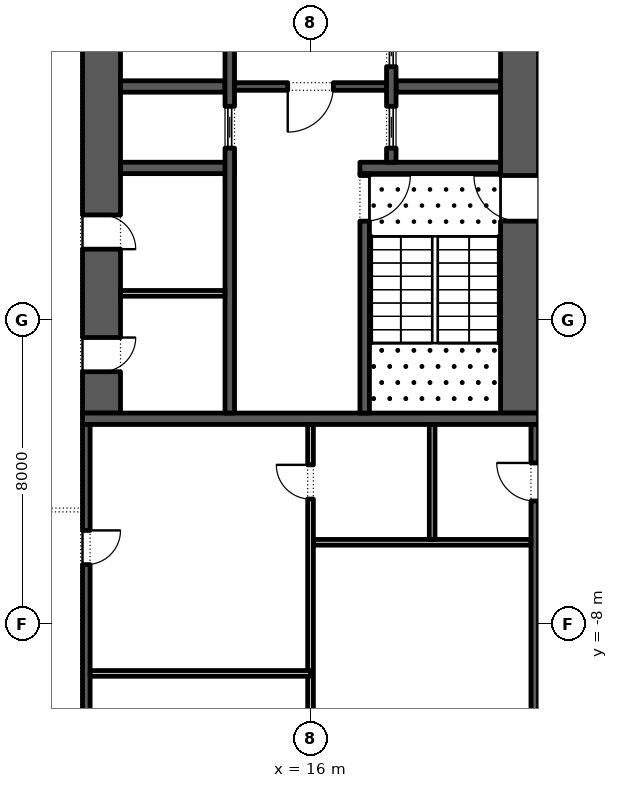
"""IFC4 building model, lengths in metres.
Left out: names, types, materials, properties, quantities, classifications, styles, units other than length and angle.
Written with IfcOpenShell. Run it as: python <this file> out.ifc"""

import sys

from ifc_helpers import new_model, si_unit, direction, frame, frame_2d, origin, place, context, subcontext, project, spatial, rectangle, extrude, element, fill, save


model = new_model("IFC4")
c1 = context("Model", 3, precision=1e-05, world=origin(), true_north=direction((0.0, 1.0)))
c2 = subcontext(c1, "Body", "Model", "MODEL_VIEW")
j1 = project(units=[si_unit("LENGTHUNIT", "METRE"), si_unit("PLANEANGLEUNIT", "RADIAN")], contexts=[c1])
p1 = place(None, origin())
s1 = spatial("IfcSite", under=j1, at=p1, CompositionType="ELEMENT")
p2 = place(p1, origin())
s2 = spatial("IfcBuilding", under=s1, at=p2, CompositionType="ELEMENT")
p3 = place(p2, frame((0.0, 0.0, 33.6)))
s3 = spatial("IfcBuildingStorey", under=s2, at=p3, CompositionType="ELEMENT", Elevation=33.6)
p4 = place(p3, frame((21.5, -2.45, 0.0), z_axis=(0.0, 0.0, 1.0), x_axis=(0.0, 1.0, 0.0)))
e1 = element("IfcWall", 1, at=p4, inside=s3, PredefinedType="SHEAR", context=c2, shape_type="SweptSolid", body=[
    extrude(rectangle(XDim=27.9, YDim=1.0, at=frame_2d((13.95, 0.0))), origin(), (0.0, 0.0, 1.0), 5.8),
])
p5 = place(p4, frame((5.05, 0.0, 0.0)))
e2 = element("IfcOpeningElement", 2, at=p5, cuts=e1, PredefinedType="OPENING", context=c2, shape_type="SweptSolid", body=[
    extrude(rectangle(XDim=1.2, YDim=2.1, at=frame_2d((0.6, 1.05))), frame((0.0, 0.51, 0.0), z_axis=(0.0, -1.0, 0.0), x_axis=(1.0, 0.0, 0.0)), (0.0, 0.0, 1.0), 1.02),
])
p6 = place(p4, frame((21.65, 0.0, 0.0)))
e3 = element("IfcOpeningElement", 3, at=p6, cuts=e1, PredefinedType="OPENING", context=c2, shape_type="SweptSolid", body=[
    extrude(rectangle(XDim=1.2, YDim=2.1, at=frame_2d((0.6, 1.05))), frame((0.0, 0.51, 0.0), z_axis=(0.0, -1.0, 0.0), x_axis=(1.0, 0.0, 0.0)), (0.0, 0.0, 1.0), 1.02),
])
p7 = place(p3, frame((10.5, -2.45, 0.0), z_axis=(0.0, 0.0, 1.0), x_axis=(0.0, 1.0, 0.0)))
e4 = element("IfcWall", 4, at=p7, inside=s3, PredefinedType="SHEAR", context=c2, shape_type="SweptSolid", body=[
    extrude(rectangle(XDim=27.9, YDim=1.0, at=frame_2d((13.95, 0.0))), origin(), (0.0, 0.0, 1.0), 5.8),
])
p8 = place(p7, frame((23.65, 0.0, 0.0)))
e5 = element("IfcOpeningElement", 5, at=p8, cuts=e4, PredefinedType="OPENING", context=c2, shape_type="SweptSolid", body=[
    extrude(rectangle(XDim=2.4, YDim=2.1, at=frame_2d((1.2, 1.05))), frame((0.0, 0.51, 0.0), z_axis=(0.0, -1.0, 0.0), x_axis=(1.0, 0.0, 0.0)), (0.0, 0.0, 1.0), 1.02),
])
p9 = place(p7, frame((1.087, 0.0, 0.0)))
e6 = element("IfcOpeningElement", 6, at=p9, cuts=e4, PredefinedType="OPENING", context=c2, shape_type="SweptSolid", body=[
    extrude(rectangle(XDim=0.9, YDim=2.1, at=frame_2d((0.45, 1.05))), frame((0.0, 0.51, 0.0), z_axis=(0.0, -1.0, 0.0), x_axis=(1.0, 0.0, 0.0)), (0.0, 0.0, 1.0), 1.02),
])
p10 = place(p7, frame((4.312, 0.0, 0.0)))
e7 = element("IfcOpeningElement", 7, at=p10, cuts=e4, PredefinedType="OPENING", context=c2, shape_type="SweptSolid", body=[
    extrude(rectangle(XDim=0.9, YDim=2.1, at=frame_2d((0.45, 1.05))), frame((0.0, 0.51, 0.0), z_axis=(0.0, -1.0, 0.0), x_axis=(1.0, 0.0, 0.0)), (0.0, 0.0, 1.0), 1.02),
])
p11 = place(p3, frame((10.0, -2.6, 0.0), z_axis=(0.0, 0.0, 1.0), x_axis=(1.0, 0.0, 0.0)))
e8 = element("IfcWall", 8, at=p11, inside=s3, PredefinedType="SHEAR", context=c2, shape_type="SweptSolid", body=[
    extrude(rectangle(XDim=12.0, YDim=0.3, at=frame_2d((6.0, 0.0))), origin(), (0.0, 0.0, 1.0), 5.8),
])
p12 = place(p3, frame((17.3, 4.0, 0.0), z_axis=(0.0, 0.0, 1.0), x_axis=(1.0, 0.0, 0.0)))
e9 = element("IfcWall", 9, at=p12, inside=s3, PredefinedType="SHEAR", context=c2, shape_type="SweptSolid", body=[
    extrude(rectangle(XDim=3.7, YDim=0.3, at=frame_2d((1.85, 0.0))), origin(), (0.0, 0.0, 1.0), 5.8),
])
p13 = place(p3, frame((17.425, -2.45, 0.0), z_axis=(0.0, 0.0, 1.0), x_axis=(0.0, 1.0, 0.0)))
e10 = element("IfcWall", 10, at=p13, inside=s3, PredefinedType="SHEAR", context=c2, shape_type="SweptSolid", body=[
    extrude(rectangle(XDim=6.3, YDim=0.25, at=frame_2d((3.15, 0.0))), origin(), (0.0, 0.0, 1.0), 5.8),
])
p14 = place(p13, frame((5.05, 0.0, 0.0)))
e11 = element("IfcOpeningElement", 11, at=p14, cuts=e10, PredefinedType="OPENING", context=c2, shape_type="SweptSolid", body=[
    extrude(rectangle(XDim=1.2, YDim=2.1, at=frame_2d((0.6, 1.05))), frame((0.0, 0.135, 0.0), z_axis=(0.0, -1.0, 0.0), x_axis=(1.0, 0.0, 0.0)), (0.0, 0.0, 1.0), 0.27),
])
p15 = place(p3, frame((18.25, 6.143, 0.0), z_axis=(0.0, 0.0, 1.0), x_axis=(1.0, 0.0, 0.0)))
e12 = element("IfcWall", 12, at=p15, inside=s3, PredefinedType="SHEAR", context=c2, shape_type="SweptSolid", body=[
    extrude(rectangle(XDim=2.75, YDim=0.3, at=frame_2d((1.375, 0.0))), origin(), (0.0, 0.0, 1.0), 5.8),
])
p16 = place(p3, frame((18.125, 4.15, 0.0), z_axis=(0.0, 0.0, 1.0), x_axis=(0.0, 1.0, 0.0)))
e13 = element("IfcWall", 13, at=p16, inside=s3, PredefinedType="SHEAR", context=c2, shape_type="SweptSolid", body=[
    extrude(rectangle(XDim=14.7, YDim=0.25, at=frame_2d((7.35, 0.0))), origin(), (0.0, 0.0, 1.0), 5.8),
])
p17 = place(p16, frame((0.371, 0.0, 0.0)))
e14 = element("IfcOpeningElement", 14, at=p17, cuts=e13, PredefinedType="OPENING", context=c2, shape_type="SweptSolid", body=[
    extrude(rectangle(XDim=1.1, YDim=2.1, at=frame_2d((0.55, 1.05))), frame((0.0, 0.135, 0.0), z_axis=(0.0, -1.0, 0.0), x_axis=(1.0, 0.0, 0.0)), (0.0, 0.0, 1.0), 0.27),
])
p18 = place(p16, frame((2.514, 0.0, 0.0)))
e15 = element("IfcOpeningElement", 15, at=p18, cuts=e13, PredefinedType="OPENING", context=c2, shape_type="SweptSolid", body=[
    extrude(rectangle(XDim=1.1, YDim=2.1, at=frame_2d((0.55, 1.05))), frame((0.0, 0.135, 0.0), z_axis=(0.0, -1.0, 0.0), x_axis=(1.0, 0.0, 0.0)), (0.0, 0.0, 1.0), 0.27),
])
p19 = place(p16, frame((4.657, 0.0, 0.0)))
e16 = element("IfcOpeningElement", 16, at=p19, cuts=e13, PredefinedType="OPENING", context=c2, shape_type="SweptSolid", body=[
    extrude(rectangle(XDim=1.1, YDim=2.1, at=frame_2d((0.55, 1.05))), frame((0.0, 0.135, 0.0), z_axis=(0.0, -1.0, 0.0), x_axis=(1.0, 0.0, 0.0)), (0.0, 0.0, 1.0), 0.27),
])
p20 = place(p16, frame((6.8, 0.0, 0.0)))
e17 = element("IfcOpeningElement", 17, at=p20, cuts=e13, PredefinedType="OPENING", context=c2, shape_type="SweptSolid", body=[
    extrude(rectangle(XDim=1.1, YDim=2.1, at=frame_2d((0.55, 1.05))), frame((0.0, 0.135, 0.0), z_axis=(0.0, -1.0, 0.0), x_axis=(1.0, 0.0, 0.0)), (0.0, 0.0, 1.0), 0.27),
])
p21 = place(p16, frame((8.943, 0.0, 0.0)))
e18 = element("IfcOpeningElement", 18, at=p21, cuts=e13, PredefinedType="OPENING", context=c2, shape_type="SweptSolid", body=[
    extrude(rectangle(XDim=1.1, YDim=2.1, at=frame_2d((0.55, 1.05))), frame((0.0, 0.135, 0.0), z_axis=(0.0, -1.0, 0.0), x_axis=(1.0, 0.0, 0.0)), (0.0, 0.0, 1.0), 0.27),
])
p22 = place(p16, frame((11.086, 0.0, 0.0)))
e19 = element("IfcOpeningElement", 19, at=p22, cuts=e13, PredefinedType="OPENING", context=c2, shape_type="SweptSolid", body=[
    extrude(rectangle(XDim=1.1, YDim=2.1, at=frame_2d((0.55, 1.05))), frame((0.0, 0.135, 0.0), z_axis=(0.0, -1.0, 0.0), x_axis=(1.0, 0.0, 0.0)), (0.0, 0.0, 1.0), 0.27),
])
p23 = place(p16, frame((13.229, 0.0, 0.0)))
e20 = element("IfcOpeningElement", 20, at=p23, cuts=e13, PredefinedType="OPENING", context=c2, shape_type="SweptSolid", body=[
    extrude(rectangle(XDim=1.1, YDim=2.1, at=frame_2d((0.55, 1.05))), frame((0.0, 0.135, 0.0), z_axis=(0.0, -1.0, 0.0), x_axis=(1.0, 0.0, 0.0)), (0.0, 0.0, 1.0), 0.27),
])
p24 = place(p3, frame((11.0, 4.0, 0.0), z_axis=(0.0, 0.0, 1.0), x_axis=(1.0, 0.0, 0.0)))
e21 = element("IfcWall", 21, at=p24, inside=s3, PredefinedType="SHEAR", context=c2, shape_type="SweptSolid", body=[
    extrude(rectangle(XDim=3.0, YDim=0.3, at=frame_2d((1.5, 0.0))), origin(), (0.0, 0.0, 1.0), 5.8),
])
p25 = place(p3, frame((11.0, 6.143, 0.0), z_axis=(0.0, 0.0, 1.0), x_axis=(1.0, 0.0, 0.0)))
e22 = element("IfcWall", 22, at=p25, inside=s3, PredefinedType="SHEAR", context=c2, shape_type="SweptSolid", body=[
    extrude(rectangle(XDim=2.75, YDim=0.3, at=frame_2d((1.375, 0.0))), origin(), (0.0, 0.0, 1.0), 5.8),
])
p26 = place(p3, frame((13.875, -2.45, 0.0), z_axis=(0.0, 0.0, 1.0), x_axis=(0.0, 1.0, 0.0)))
e23 = element("IfcWall", 23, at=p26, inside=s3, PredefinedType="SHEAR", context=c2, shape_type="SweptSolid", body=[
    extrude(rectangle(XDim=21.3, YDim=0.25, at=frame_2d((10.65, 0.0))), origin(), (0.0, 0.0, 1.0), 5.8),
])
p27 = place(p26, frame((14.571, 0.0, 0.0)))
e24 = element("IfcOpeningElement", 24, at=p27, cuts=e23, PredefinedType="OPENING", context=c2, shape_type="SweptSolid", body=[
    extrude(rectangle(XDim=0.9, YDim=2.1, at=frame_2d((0.45, 1.05))), frame((0.0, 0.135, 0.0), z_axis=(0.0, -1.0, 0.0), x_axis=(1.0, 0.0, 0.0)), (0.0, 0.0, 1.0), 0.27),
])
p28 = place(p26, frame((6.971, 0.0, 0.0)))
e25 = element("IfcOpeningElement", 25, at=p28, cuts=e23, PredefinedType="OPENING", context=c2, shape_type="SweptSolid", body=[
    extrude(rectangle(XDim=1.1, YDim=2.1, at=frame_2d((0.55, 1.05))), frame((0.0, 0.135, 0.0), z_axis=(0.0, -1.0, 0.0), x_axis=(1.0, 0.0, 0.0)), (0.0, 0.0, 1.0), 0.27),
])
p29 = place(p3, frame((14.0, 6.143, 0.0), z_axis=(0.0, 0.0, 1.0), x_axis=(1.0, 0.0, 0.0)))
e26 = element("IfcWall", 26, at=p29, inside=s3, PredefinedType="SHEAR", context=c2, shape_type="SweptSolid", body=[
    extrude(rectangle(XDim=4.0, YDim=0.2, at=frame_2d((2.0, 0.0))), origin(), (0.0, 0.0, 1.0), 5.8),
])
p30 = place(p29, frame((1.4, 0.0, 0.0)))
e27 = element("IfcOpeningElement", 27, at=p30, cuts=e26, PredefinedType="OPENING", context=c2, shape_type="SweptSolid", body=[
    extrude(rectangle(XDim=1.2, YDim=2.1, at=frame_2d((0.6, 1.05))), frame((0.0, 0.11, 0.0), z_axis=(0.0, -1.0, 0.0), x_axis=(1.0, 0.0, 0.0)), (0.0, 0.0, 1.0), 0.22),
])
p31 = place(p3, frame((11.0, 0.7, 0.0), z_axis=(0.0, 0.0, 1.0), x_axis=(1.0, 0.0, 0.0)))
e28 = element("IfcWall", 28, at=p31, inside=s3, PredefinedType="PARTITIONING", context=c2, shape_type="SweptSolid", body=[
    extrude(rectangle(XDim=2.75, YDim=0.15, at=frame_2d((1.375, 0.0))), origin(), (0.0, 0.0, 1.0), 5.8),
])
p32 = place(p3, frame((21.9, -15.8, 0.0), z_axis=(0.0, 0.0, 1.0), x_axis=(0.0, 1.0, 0.0)))
e29 = element("IfcWall", 29, at=p32, inside=s3, PredefinedType="SHEAR", context=c2, shape_type="SweptSolid", body=[
    extrude(rectangle(XDim=13.05, YDim=0.2, at=frame_2d((6.525, 0.0))), origin(), (0.0, 0.0, 1.0), 5.8),
])
p33 = place(p32, frame((4.488, 0.0, 0.0)))
e30 = element("IfcOpeningElement", 30, at=p33, cuts=e29, PredefinedType="OPENING", context=c2, shape_type="SweptSolid", body=[
    extrude(rectangle(XDim=0.9, YDim=2.1, at=frame_2d((0.45, 1.05))), frame((0.0, 0.11, 0.0), z_axis=(0.0, -1.0, 0.0), x_axis=(1.0, 0.0, 0.0)), (0.0, 0.0, 1.0), 0.22),
])
p34 = place(p32, frame((11.038, 0.0, 0.0)))
e31 = element("IfcOpeningElement", 31, at=p34, cuts=e29, PredefinedType="OPENING", context=c2, shape_type="SweptSolid", body=[
    extrude(rectangle(XDim=1.0, YDim=2.1, at=frame_2d((0.5, 1.05))), frame((0.0, 0.11, 0.0), z_axis=(0.0, -1.0, 0.0), x_axis=(1.0, 0.0, 0.0)), (0.0, 0.0, 1.0), 0.22),
])
p35 = place(p3, frame((10.1, -15.8, 0.0), z_axis=(0.0, 0.0, 1.0), x_axis=(0.0, 1.0, 0.0)))
e32 = element("IfcWall", 32, at=p35, inside=s3, PredefinedType="SHEAR", context=c2, shape_type="SweptSolid", body=[
    extrude(rectangle(XDim=13.05, YDim=0.2, at=frame_2d((6.525, 0.0))), origin(), (0.0, 0.0, 1.0), 5.8),
])
p36 = place(p35, frame((2.762, 0.0, 0.0)))
e33 = element("IfcOpeningElement", 33, at=p36, cuts=e32, PredefinedType="OPENING", context=c2, shape_type="SweptSolid", body=[
    extrude(rectangle(XDim=0.9, YDim=2.1, at=frame_2d((0.45, 1.05))), frame((0.0, 0.11, 0.0), z_axis=(0.0, -1.0, 0.0), x_axis=(1.0, 0.0, 0.0)), (0.0, 0.0, 1.0), 0.22),
])
p37 = place(p35, frame((9.363, 0.0, 0.0)))
e34 = element("IfcOpeningElement", 34, at=p37, cuts=e32, PredefinedType="OPENING", context=c2, shape_type="SweptSolid", body=[
    extrude(rectangle(XDim=0.9, YDim=2.1, at=frame_2d((0.45, 1.05))), frame((0.0, 0.11, 0.0), z_axis=(0.0, -1.0, 0.0), x_axis=(1.0, 0.0, 0.0)), (0.0, 0.0, 1.0), 0.22),
])
p38 = place(p3, frame((16.0, -15.8, 0.0), z_axis=(0.0, 0.0, 1.0), x_axis=(0.0, 1.0, 0.0)))
e35 = element("IfcWall", 35, at=p38, inside=s3, PredefinedType="PARTITIONING", context=c2, shape_type="SweptSolid", body=[
    extrude(rectangle(XDim=13.05, YDim=0.15, at=frame_2d((6.525, 0.0))), origin(), (0.0, 0.0, 1.0), 5.8),
])
p39 = place(p38, frame((11.087, 0.0, 0.0)))
e36 = element("IfcOpeningElement", 36, at=p39, cuts=e35, PredefinedType="OPENING", context=c2, shape_type="SweptSolid", body=[
    extrude(rectangle(XDim=0.9, YDim=2.1, at=frame_2d((0.45, 1.05))), frame((0.0, 0.085, 0.0), z_axis=(0.0, -1.0, 0.0), x_axis=(1.0, 0.0, 0.0)), (0.0, 0.0, 1.0), 0.17),
])
p40 = place(p3, frame((10.2, -9.3, 0.0), z_axis=(0.0, 0.0, 1.0), x_axis=(1.0, 0.0, 0.0)))
e37 = element("IfcWall", 37, at=p40, inside=s3, PredefinedType="PARTITIONING", context=c2, shape_type="SweptSolid", body=[
    extrude(rectangle(XDim=5.8, YDim=0.15, at=frame_2d((2.9, 0.0))), origin(), (0.0, 0.0, 1.0), 5.8),
])
p41 = place(p3, frame((16.075, -5.85, 0.0), z_axis=(0.0, 0.0, 1.0), x_axis=(1.0, 0.0, 0.0)))
e38 = element("IfcWall", 38, at=p41, inside=s3, PredefinedType="PARTITIONING", context=c2, shape_type="SweptSolid", body=[
    extrude(rectangle(XDim=5.725, YDim=0.15, at=frame_2d((2.863, 0.0))), origin(), (0.0, 0.0, 1.0), 5.8),
])
p42 = place(p3, frame((19.2, -5.775, 0.0), z_axis=(0.0, 0.0, 1.0), x_axis=(0.0, 1.0, 0.0)))
e39 = element("IfcWall", 39, at=p42, inside=s3, PredefinedType="PARTITIONING", context=c2, shape_type="SweptSolid", body=[
    extrude(rectangle(XDim=3.025, YDim=0.15, at=frame_2d((1.512, 0.0))), origin(), (0.0, 0.0, 1.0), 5.8),
])
p43 = place(p17, origin())
e40 = element("IfcDoor", 40, at=p43, inside=s3, OperationType="SLIDING_TO_LEFT", PredefinedType="DOOR", context=c2, shape_type="SweptSolid", body=[
    extrude(rectangle(XDim=1.1, YDim=2.1, at=frame_2d((0.55, 1.05))), frame((0.0, 0.025, 0.0), z_axis=(0.0, -1.0, 0.0), x_axis=(1.0, 0.0, 0.0)), (0.0, 0.0, 1.0), 0.05),
])
fill(e14, e40)
p44 = place(p18, origin())
e41 = element("IfcDoor", 41, at=p44, inside=s3, OperationType="SLIDING_TO_LEFT", PredefinedType="DOOR", context=c2, shape_type="SweptSolid", body=[
    extrude(rectangle(XDim=1.1, YDim=2.1, at=frame_2d((0.55, 1.05))), frame((0.0, 0.025, 0.0), z_axis=(0.0, -1.0, 0.0), x_axis=(1.0, 0.0, 0.0)), (0.0, 0.0, 1.0), 0.05),
])
fill(e15, e41)
p45 = place(p28, origin())
e42 = element("IfcDoor", 42, at=p45, inside=s3, OperationType="SLIDING_TO_LEFT", PredefinedType="DOOR", context=c2, shape_type="SweptSolid", body=[
    extrude(rectangle(XDim=1.1, YDim=2.1, at=frame_2d((0.55, 1.05))), frame((0.0, 0.025, 0.0), z_axis=(0.0, -1.0, 0.0), x_axis=(1.0, 0.0, 0.0)), (0.0, 0.0, 1.0), 0.05),
])
fill(e25, e42)
p46 = place(p30, frame((1.2, 0.0, 0.0), z_axis=(0.0, 0.0, 1.0), x_axis=(-1.0, 0.0, 0.0)))
e43 = element("IfcDoor", 43, at=p46, inside=s3, OperationType="SINGLE_SWING_LEFT", PredefinedType="DOOR", context=c2, shape_type="SweptSolid", body=[
    extrude(rectangle(XDim=1.2, YDim=2.1, at=frame_2d((0.6, 1.05))), frame((0.0, 0.025, 0.0), z_axis=(0.0, -1.0, 0.0), x_axis=(1.0, 0.0, 0.0)), (0.0, 0.0, 1.0), 0.05),
])
fill(e27, e43)
p47 = place(p14, frame((1.2, 0.0, 0.0), z_axis=(0.0, 0.0, 1.0), x_axis=(-1.0, 0.0, 0.0)))
e44 = element("IfcDoor", 44, at=p47, inside=s3, OperationType="SINGLE_SWING_RIGHT", PredefinedType="DOOR", context=c2, shape_type="SweptSolid", body=[
    extrude(rectangle(XDim=1.2, YDim=2.1, at=frame_2d((0.6, 1.05))), frame((0.0, 0.025, 0.0), z_axis=(0.0, -1.0, 0.0), x_axis=(1.0, 0.0, 0.0)), (0.0, 0.0, 1.0), 0.05),
])
fill(e11, e44)
p48 = place(p5, origin())
e45 = element("IfcDoor", 45, at=p48, inside=s3, OperationType="SINGLE_SWING_LEFT", PredefinedType="DOOR", context=c2, shape_type="SweptSolid", body=[
    extrude(rectangle(XDim=1.2, YDim=2.1, at=frame_2d((0.6, 1.05))), frame((0.0, 0.025, 0.0), z_axis=(0.0, -1.0, 0.0), x_axis=(1.0, 0.0, 0.0)), (0.0, 0.0, 1.0), 0.05),
])
fill(e2, e45)
p49 = place(p9, frame((0.9, -0.95, 0.0), z_axis=(0.0, 0.0, 1.0), x_axis=(-1.0, 0.0, 0.0)))
e46 = element("IfcDoor", 46, at=p49, inside=s3, OperationType="SINGLE_SWING_RIGHT", PredefinedType="DOOR", context=c2, shape_type="SweptSolid", body=[
    extrude(rectangle(XDim=0.9, YDim=2.1, at=frame_2d((0.45, 1.05))), frame((0.0, -0.45, 0.0), z_axis=(0.0, -1.0, 0.0), x_axis=(1.0, 0.0, 0.0)), (0.0, 0.0, 1.0), 0.05),
])
fill(e6, e46)
p50 = place(p10, frame((0.9, -0.95, 0.0), z_axis=(0.0, 0.0, 1.0), x_axis=(-1.0, 0.0, 0.0)))
e47 = element("IfcDoor", 47, at=p50, inside=s3, OperationType="SINGLE_SWING_LEFT", PredefinedType="DOOR", context=c2, shape_type="SweptSolid", body=[
    extrude(rectangle(XDim=0.9, YDim=2.1, at=frame_2d((0.45, 1.05))), frame((0.0, -0.45, 0.0), z_axis=(0.0, -1.0, 0.0), x_axis=(1.0, 0.0, 0.0)), (0.0, 0.0, 1.0), 0.05),
])
fill(e7, e47)
p51 = place(p34, origin())
e48 = element("IfcDoor", 48, at=p51, inside=s3, OperationType="SINGLE_SWING_LEFT", PredefinedType="DOOR", context=c2, shape_type="SweptSolid", body=[
    extrude(rectangle(XDim=1.0, YDim=2.1, at=frame_2d((0.5, 1.05))), frame((0.0, 0.1, 0.0), z_axis=(0.0, -1.0, 0.0), x_axis=(1.0, 0.0, 0.0)), (0.0, 0.0, 1.0), 0.05),
])
fill(e31, e48)
p52 = place(p39, origin())
e49 = element("IfcDoor", 49, at=p52, inside=s3, OperationType="SINGLE_SWING_LEFT", PredefinedType="DOOR", context=c2, shape_type="SweptSolid", body=[
    extrude(rectangle(XDim=0.9, YDim=2.1, at=frame_2d((0.45, 1.05))), frame((0.0, 0.025, 0.0), z_axis=(0.0, -1.0, 0.0), x_axis=(1.0, 0.0, 0.0)), (0.0, 0.0, 1.0), 0.05),
])
fill(e36, e49)
p53 = place(p37, frame((0.9, -0.15, 0.0), z_axis=(0.0, 0.0, 1.0), x_axis=(-1.0, 0.0, 0.0)))
e50 = element("IfcDoor", 50, at=p53, inside=s3, OperationType="SINGLE_SWING_RIGHT", PredefinedType="DOOR", context=c2, shape_type="SweptSolid", body=[
    extrude(rectangle(XDim=0.9, YDim=2.1, at=frame_2d((0.45, 1.05))), frame((0.0, -0.05, 0.0), z_axis=(0.0, -1.0, 0.0), x_axis=(1.0, 0.0, 0.0)), (0.0, 0.0, 1.0), 0.05),
])
fill(e34, e50)
save(model, sys.argv[1])
